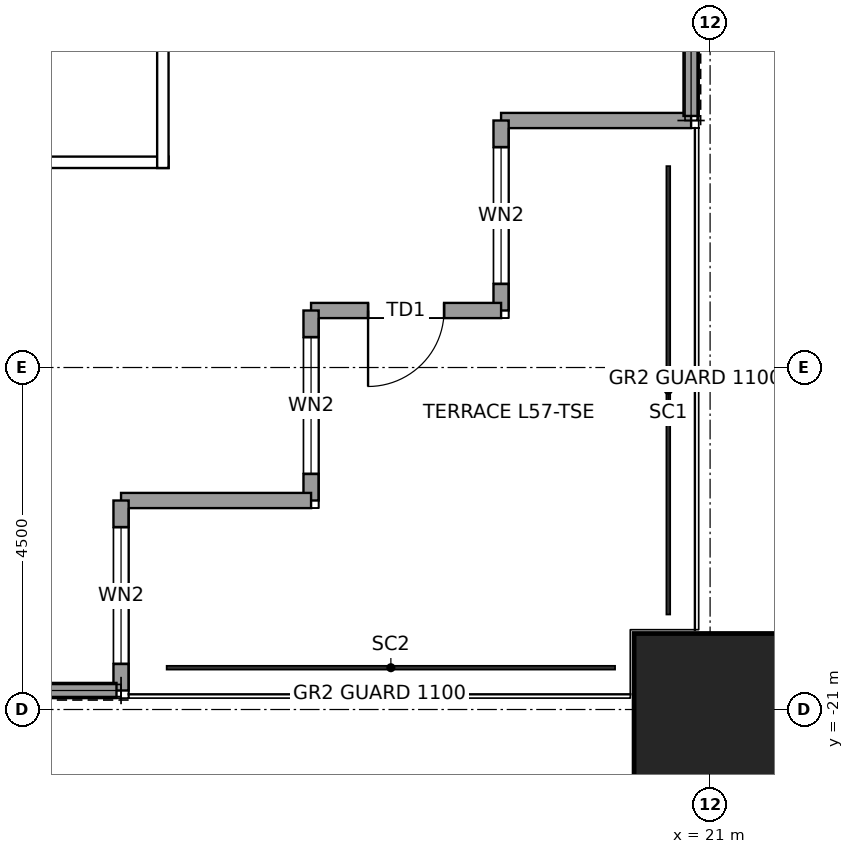
"""IFC4 building model, lengths in metres.
Left out: names, types, materials, properties, quantities, classifications, styles, units other than length and angle.
Written with IfcOpenShell. Run it as: python <this file> out.ifc"""

import sys

from ifc_helpers import new_model, si_unit, direction, frame, frame_2d, origin, origin_2d, place, context, subcontext, project, spatial, rectangle, hollow_rectangle, extrude, element, fill, save


model = new_model("IFC4")
c1 = context("Model", 3, precision=1e-05, world=origin(), true_north=direction((0.0, 1.0)))
c2 = subcontext(c1, "Body", "Model", "MODEL_VIEW")
j1 = project(units=[si_unit("LENGTHUNIT", "METRE"), si_unit("PLANEANGLEUNIT", "RADIAN")], contexts=[c1])
p1 = place(None, origin())
s1 = spatial("IfcSite", under=j1, at=p1, CompositionType="ELEMENT")
p2 = place(p1, origin())
s2 = spatial("IfcBuilding", under=s1, at=p2, CompositionType="ELEMENT")
p3 = place(p2, frame((0.0, 0.0, 263.9)))
s3 = spatial("IfcBuildingStorey", under=s2, at=p3, CompositionType="ELEMENT", Elevation=263.9)
p4 = place(p3, frame((21.0, -21.0, 0.0), z_axis=(0.0, 0.0, 1.0), x_axis=(1.0, 0.0, 0.0)))
e1 = element("IfcColumn", 1, at=p4, inside=s3, PredefinedType="COLUMN", context=c2, shape_type="SweptSolid", body=[
    extrude(hollow_rectangle(XDim=2.0, YDim=2.0, WallThickness=0.095, at=origin_2d()), origin(), (0.0, 0.0, 1.0), 4.0),
])
p5 = place(p3, frame((20.75, -13.25, 0.0), z_axis=(0.0, 0.0, 1.0), x_axis=(-1.0, 0.0, 0.0)))
e2 = element("IfcWall", 2, at=p5, inside=s3, PredefinedType="SOLIDWALL", context=c2, shape_type="SweptSolid", body=[
    extrude(rectangle(XDim=2.5, YDim=0.2, at=frame_2d((1.25, 0.0))), origin(), (0.0, 0.0, 1.0), 3.85),
])
p6 = place(p3, frame((18.25, -13.25, 0.0), z_axis=(0.0, 0.0, 1.0), x_axis=(0.0, -1.0, 0.0)))
e3 = element("IfcWall", 3, at=p6, inside=s3, PredefinedType="SOLIDWALL", context=c2, shape_type="SweptSolid", body=[
    extrude(rectangle(XDim=2.5, YDim=0.2, at=frame_2d((1.25, 0.0))), origin(), (0.0, 0.0, 1.0), 3.85),
])
p7 = place(p6, frame((0.35, 0.0, 0.3)))
e4 = element("IfcOpeningElement", 4, at=p7, cuts=e3, PredefinedType="OPENING", context=c2, shape_type="SweptSolid", body=[
    extrude(rectangle(XDim=1.8, YDim=2.4, at=frame_2d((0.9, 1.2))), frame((0.0, 0.11, 0.0), z_axis=(0.0, -1.0, 0.0), x_axis=(1.0, 0.0, 0.0)), (0.0, 0.0, 1.0), 0.22),
])
p8 = place(p3, frame((18.25, -15.75, 0.0), z_axis=(0.0, 0.0, 1.0), x_axis=(-1.0, 0.0, 0.0)))
e5 = element("IfcWall", 5, at=p8, inside=s3, PredefinedType="SOLIDWALL", context=c2, shape_type="SweptSolid", body=[
    extrude(rectangle(XDim=2.5, YDim=0.2, at=frame_2d((1.25, 0.0))), origin(), (0.0, 0.0, 1.0), 3.317),
])
p9 = place(p8, frame((0.75, 0.0, 0.0)))
e6 = element("IfcOpeningElement", 6, at=p9, cuts=e5, PredefinedType="OPENING", context=c2, shape_type="SweptSolid", body=[
    extrude(rectangle(XDim=1.0, YDim=2.4, at=frame_2d((0.5, 1.2))), frame((0.0, 0.11, 0.0), z_axis=(0.0, -1.0, 0.0), x_axis=(1.0, 0.0, 0.0)), (0.0, 0.0, 1.0), 0.22),
])
p10 = place(p3, frame((15.75, -15.75, 0.0), z_axis=(0.0, 0.0, 1.0), x_axis=(0.0, -1.0, 0.0)))
e7 = element("IfcWall", 7, at=p10, inside=s3, PredefinedType="SOLIDWALL", context=c2, shape_type="SweptSolid", body=[
    extrude(rectangle(XDim=2.5, YDim=0.2, at=frame_2d((1.25, 0.0))), origin(), (0.0, 0.0, 1.0), 3.85),
])
p11 = place(p10, frame((0.35, 0.0, 0.3)))
e8 = element("IfcOpeningElement", 8, at=p11, cuts=e7, PredefinedType="OPENING", context=c2, shape_type="SweptSolid", body=[
    extrude(rectangle(XDim=1.8, YDim=2.4, at=frame_2d((0.9, 1.2))), frame((0.0, 0.11, 0.0), z_axis=(0.0, -1.0, 0.0), x_axis=(1.0, 0.0, 0.0)), (0.0, 0.0, 1.0), 0.22),
])
p12 = place(p3, frame((15.75, -18.25, 0.0), z_axis=(0.0, 0.0, 1.0), x_axis=(-1.0, 0.0, 0.0)))
e9 = element("IfcWall", 9, at=p12, inside=s3, PredefinedType="SOLIDWALL", context=c2, shape_type="SweptSolid", body=[
    extrude(rectangle(XDim=2.5, YDim=0.2, at=frame_2d((1.25, 0.0))), origin(), (0.0, 0.0, 1.0), 3.85),
])
p13 = place(p3, frame((13.25, -18.25, 0.0), z_axis=(0.0, 0.0, 1.0), x_axis=(0.0, -1.0, 0.0)))
e10 = element("IfcWall", 10, at=p13, inside=s3, PredefinedType="SOLIDWALL", context=c2, shape_type="SweptSolid", body=[
    extrude(rectangle(XDim=2.5, YDim=0.2, at=frame_2d((1.25, 0.0))), origin(), (0.0, 0.0, 1.0), 3.85),
])
p14 = place(p13, frame((0.35, 0.0, 0.3)))
e11 = element("IfcOpeningElement", 11, at=p14, cuts=e10, PredefinedType="OPENING", context=c2, shape_type="SweptSolid", body=[
    extrude(rectangle(XDim=1.8, YDim=2.4, at=frame_2d((0.9, 1.2))), frame((0.0, 0.11, 0.0), z_axis=(0.0, -1.0, 0.0), x_axis=(1.0, 0.0, 0.0)), (0.0, 0.0, 1.0), 0.22),
])
for number, where, z_axis, x_axis in (
    (12, (20.75, -10.435, 0.0), (0.0, 0.0, 1.0), (0.0, -1.0, 0.0)),
    (13, (13.19, -20.75, 0.0), (0.0, 0.0, 1.0), (-1.0, 0.0, 0.0)),
):
    element("IfcWall", number, at=place(p3, frame(where, z_axis=z_axis, x_axis=x_axis)), inside=s3, PredefinedType="SOLIDWALL", context=c2, shape_type="SweptSolid", body=[
        extrude(rectangle(XDim=2.755, YDim=0.2, at=frame_2d((1.377, 0.0))), origin(), (0.0, 0.0, 1.0), 3.85),
    ])
p15 = place(p3, frame((-13.875, -13.8, 0.0), z_axis=(0.0, 0.0, 1.0), x_axis=(1.0, 0.0, 0.0)))
e14 = element("IfcWall", 14, at=p15, inside=s3, PredefinedType="PARTITIONING", context=c2, shape_type="SweptSolid", body=[
    extrude(rectangle(XDim=27.75, YDim=0.15, at=frame_2d((13.875, 0.0))), origin(), (0.0, 0.0, 1.0), 3.85),
])
p16 = place(p15, frame((3.975, 0.0, 0.0)))
e15 = element("IfcOpeningElement", 15, at=p16, cuts=e14, PredefinedType="OPENING", context=c2, shape_type="SweptSolid", body=[
    extrude(rectangle(XDim=1.0, YDim=2.4, at=frame_2d((0.5, 1.2))), frame((0.0, 0.085, 0.0), z_axis=(0.0, -1.0, 0.0), x_axis=(1.0, 0.0, 0.0)), (0.0, 0.0, 1.0), 0.17),
])
p17 = place(p3, frame((13.8, -13.875, 0.0), z_axis=(0.0, 0.0, 1.0), x_axis=(0.0, 1.0, 0.0)))
e16 = element("IfcWall", 16, at=p17, inside=s3, PredefinedType="PARTITIONING", context=c2, shape_type="SweptSolid", body=[
    extrude(rectangle(XDim=11.45, YDim=0.15, at=frame_2d((5.725, 0.0))), origin(), (0.0, 0.0, 1.0), 3.85),
])
p18 = place(p17, frame((5.225, 0.0, 0.0)))
e17 = element("IfcOpeningElement", 17, at=p18, cuts=e16, PredefinedType="OPENING", context=c2, shape_type="SweptSolid", body=[
    extrude(rectangle(XDim=1.0, YDim=2.4, at=frame_2d((0.5, 1.2))), frame((0.0, 0.085, 0.0), z_axis=(0.0, -1.0, 0.0), x_axis=(1.0, 0.0, 0.0)), (0.0, 0.0, 1.0), 0.17),
])
p19 = place(p7, origin())
e18 = element("IfcWindow", 18, at=p19, inside=s3, PartitioningType="SINGLE_PANEL", PredefinedType="WINDOW", context=c2, shape_type="SweptSolid", body=[
    extrude(rectangle(XDim=1.8, YDim=2.4, at=frame_2d((0.9, 1.2))), frame((0.0, 0.03, 0.0), z_axis=(0.0, -1.0, 0.0), x_axis=(1.0, 0.0, 0.0)), (0.0, 0.0, 1.0), 0.06),
])
fill(e4, e18)
p20 = place(p9, origin())
e19 = element("IfcDoor", 19, at=p20, inside=s3, OperationType="SINGLE_SWING_RIGHT", PredefinedType="DOOR", context=c2, shape_type="SweptSolid", body=[
    extrude(rectangle(XDim=1.0, YDim=2.4, at=frame_2d((0.5, 1.2))), frame((0.0, 0.025, 0.0), z_axis=(0.0, -1.0, 0.0), x_axis=(1.0, 0.0, 0.0)), (0.0, 0.0, 1.0), 0.05),
])
fill(e6, e19)
p21 = place(p11, origin())
e20 = element("IfcWindow", 20, at=p21, inside=s3, PartitioningType="SINGLE_PANEL", PredefinedType="WINDOW", context=c2, shape_type="SweptSolid", body=[
    extrude(rectangle(XDim=1.8, YDim=2.4, at=frame_2d((0.9, 1.2))), frame((0.0, 0.03, 0.0), z_axis=(0.0, -1.0, 0.0), x_axis=(1.0, 0.0, 0.0)), (0.0, 0.0, 1.0), 0.06),
])
fill(e8, e20)
p22 = place(p14, origin())
e21 = element("IfcWindow", 21, at=p22, inside=s3, PartitioningType="SINGLE_PANEL", PredefinedType="WINDOW", context=c2, shape_type="SweptSolid", body=[
    extrude(rectangle(XDim=1.8, YDim=2.4, at=frame_2d((0.9, 1.2))), frame((0.0, 0.03, 0.0), z_axis=(0.0, -1.0, 0.0), x_axis=(1.0, 0.0, 0.0)), (0.0, 0.0, 1.0), 0.06),
])
fill(e11, e21)
save(model, sys.argv[1])
